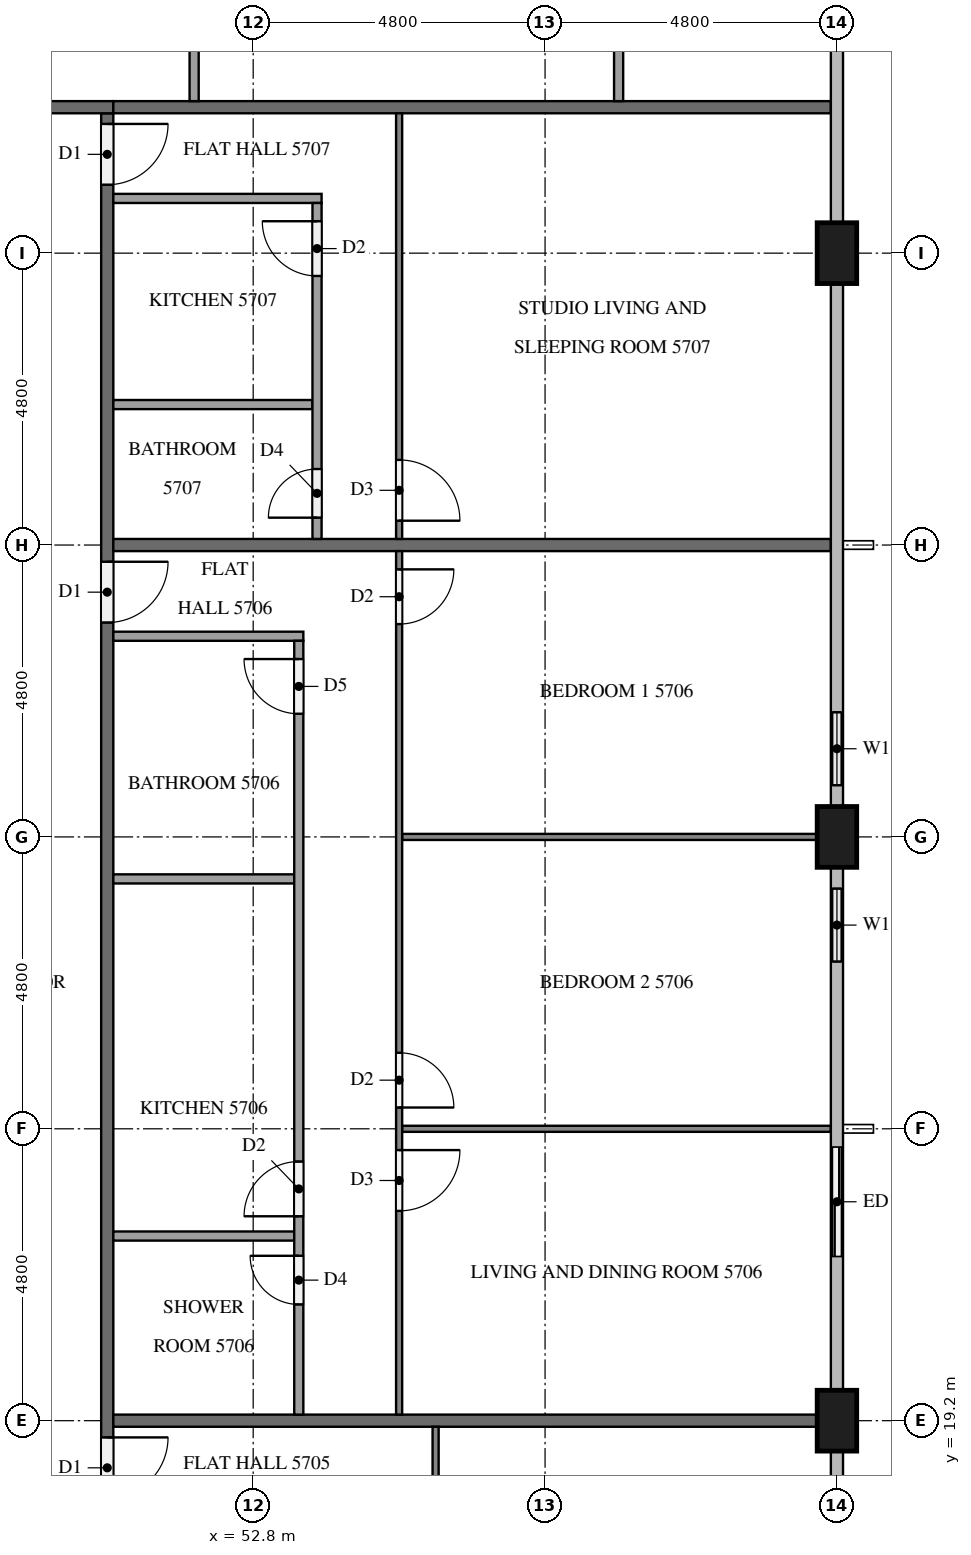
"""IFC4 building model, lengths in metres.
Left out: names, types, materials, properties, quantities, classifications, styles, units other than length and angle.
Written with IfcOpenShell. Run it as: python <this file> out.ifc"""

import sys

from ifc_helpers import new_model, si_unit, direction, frame, frame_2d, origin, origin_2d, place, context, subcontext, project, spatial, rectangle, extrude, element, fill, save


model = new_model("IFC4")
c1 = context("Model", 3, precision=1e-05, world=origin(), true_north=direction((0.0, 1.0)))
c2 = subcontext(c1, "Body", "Model", "MODEL_VIEW")
j1 = project(units=[si_unit("LENGTHUNIT", "METRE"), si_unit("PLANEANGLEUNIT", "RADIAN")], contexts=[c1])
p1 = place(None, origin())
s1 = spatial("IfcSite", under=j1, at=p1, CompositionType="ELEMENT")
p2 = place(p1, origin())
s2 = spatial("IfcBuilding", under=s1, at=p2, CompositionType="ELEMENT")
p3 = place(p2, frame((0.0, 0.0, 219.3)))
s3 = spatial("IfcBuildingStorey", under=s2, at=p3, CompositionType="ELEMENT", Elevation=219.3)
for number, where, z_axis, x_axis in (
    (1, (62.4, 19.2, 0.0), (0.0, 0.0, 1.0), (0.0, 1.0, 0.0)),
    (2, (62.4, 28.8, 0.0), (0.0, 0.0, 1.0), (0.0, 1.0, 0.0)),
    (3, (62.4, 38.4, 0.0), (0.0, 0.0, 1.0), (0.0, 1.0, 0.0)),
):
    element("IfcColumn", number, at=place(p3, frame(where, z_axis=z_axis, x_axis=x_axis)), inside=s3, PredefinedType="COLUMN", context=c2, shape_type="SweptSolid", body=[
        extrude(rectangle(XDim=1.0, YDim=0.65, at=origin_2d()), origin(), (0.0, 0.0, 1.0), 3.2),
    ])
p4 = place(p3, frame((62.4, 21.6, 0.0), z_axis=(0.0, 0.0, 1.0), x_axis=(0.0, 1.0, 0.0)))
e4 = element("IfcWall", 4, at=p4, inside=s3, PredefinedType="SOLIDWALL", context=c2, shape_type="SweptSolid", body=[
    extrude(rectangle(XDim=2.4, YDim=0.15, at=frame_2d((1.2, 0.0))), origin(), (0.0, 0.0, 1.0), 3.2),
])
p5 = place(p4, frame((0.3, 0.0, 0.0)))
e5 = element("IfcOpeningElement", 5, at=p5, cuts=e4, PredefinedType="OPENING", context=c2, shape_type="SweptSolid", body=[
    extrude(rectangle(XDim=1.8, YDim=2.4, at=frame_2d((0.9, 1.2))), frame((0.0, 0.085, 0.0), z_axis=(0.0, -1.0, 0.0), x_axis=(1.0, 0.0, 0.0)), (0.0, 0.0, 1.0), 0.17),
])
p6 = place(p3, frame((62.4, 26.4, 0.0), z_axis=(0.0, 0.0, 1.0), x_axis=(0.0, 1.0, 0.0)))
e6 = element("IfcWall", 6, at=p6, inside=s3, PredefinedType="SOLIDWALL", context=c2, shape_type="SweptSolid", body=[
    extrude(rectangle(XDim=1.9, YDim=0.15, at=frame_2d((0.95, 0.0))), origin(), (0.0, 0.0, 1.0), 3.2),
])
p7 = place(p6, frame((0.35, 0.0, 0.9)))
e7 = element("IfcOpeningElement", 7, at=p7, cuts=e6, PredefinedType="OPENING", context=c2, shape_type="SweptSolid", body=[
    extrude(rectangle(XDim=1.2, YDim=1.4, at=frame_2d((0.6, 0.7))), frame((0.0, 0.085, 0.0), z_axis=(0.0, -1.0, 0.0), x_axis=(1.0, 0.0, 0.0)), (0.0, 0.0, 1.0), 0.17),
])
p8 = place(p3, frame((62.4, 29.3, 0.0), z_axis=(0.0, 0.0, 1.0), x_axis=(0.0, 1.0, 0.0)))
e8 = element("IfcWall", 8, at=p8, inside=s3, PredefinedType="SOLIDWALL", context=c2, shape_type="SweptSolid", body=[
    extrude(rectangle(XDim=1.9, YDim=0.15, at=frame_2d((0.95, 0.0))), origin(), (0.0, 0.0, 1.0), 3.2),
])
p9 = place(p8, frame((0.35, 0.0, 0.9)))
e9 = element("IfcOpeningElement", 9, at=p9, cuts=e8, PredefinedType="OPENING", context=c2, shape_type="SweptSolid", body=[
    extrude(rectangle(XDim=1.2, YDim=1.4, at=frame_2d((0.6, 0.7))), frame((0.0, 0.085, 0.0), z_axis=(0.0, -1.0, 0.0), x_axis=(1.0, 0.0, 0.0)), (0.0, 0.0, 1.0), 0.17),
])
p10 = place(p3, frame((50.4, 40.7, 0.0), z_axis=(0.0, 0.0, 1.0), x_axis=(0.0, -1.0, 0.0)))
e10 = element("IfcWall", 10, at=p10, inside=s3, PredefinedType="PARTITIONING", context=c2, shape_type="SweptSolid", body=[
    extrude(rectangle(XDim=28.6, YDim=0.2, at=frame_2d((14.3, 0.0))), origin(), (0.0, 0.0, 1.0), 3.2),
])
p11 = place(p10, frame((21.775, 0.0, 0.0)))
e11 = element("IfcOpeningElement", 11, at=p11, cuts=e10, PredefinedType="OPENING", context=c2, shape_type="SweptSolid", body=[
    extrude(rectangle(XDim=1.0, YDim=2.1, at=frame_2d((0.5, 1.05))), frame((0.0, 0.11, 0.0), z_axis=(0.0, -1.0, 0.0), x_axis=(1.0, 0.0, 0.0)), (0.0, 0.0, 1.0), 0.22),
])
p12 = place(p10, frame((7.375, 0.0, 0.0)))
e12 = element("IfcOpeningElement", 12, at=p12, cuts=e10, PredefinedType="OPENING", context=c2, shape_type="SweptSolid", body=[
    extrude(rectangle(XDim=1.0, YDim=2.1, at=frame_2d((0.5, 1.05))), frame((0.0, 0.11, 0.0), z_axis=(0.0, -1.0, 0.0), x_axis=(1.0, 0.0, 0.0)), (0.0, 0.0, 1.0), 0.22),
])
p13 = place(p10, frame((0.175, 0.0, 0.0)))
e13 = element("IfcOpeningElement", 13, at=p13, cuts=e10, PredefinedType="OPENING", context=c2, shape_type="SweptSolid", body=[
    extrude(rectangle(XDim=1.0, YDim=2.1, at=frame_2d((0.5, 1.05))), frame((0.0, 0.11, 0.0), z_axis=(0.0, -1.0, 0.0), x_axis=(1.0, 0.0, 0.0)), (0.0, 0.0, 1.0), 0.22),
])
p14 = place(p3, frame((11.9, 40.8, 0.0), z_axis=(0.0, 0.0, 1.0), x_axis=(1.0, 0.0, 0.0)))
e14 = element("IfcWall", 14, at=p14, inside=s3, PredefinedType="PARTITIONING", context=c2, shape_type="SweptSolid", body=[
    extrude(rectangle(XDim=38.6, YDim=0.2, at=frame_2d((19.3, 0.0))), origin(), (0.0, 0.0, 1.0), 3.2),
])
p15 = place(p14, frame((33.975, 0.0, 0.0)))
e15 = element("IfcOpeningElement", 15, at=p15, cuts=e14, PredefinedType="OPENING", context=c2, shape_type="SweptSolid", body=[
    extrude(rectangle(XDim=1.0, YDim=2.1, at=frame_2d((0.5, 1.05))), frame((0.0, 0.11, 0.0), z_axis=(0.0, -1.0, 0.0), x_axis=(1.0, 0.0, 0.0)), (0.0, 0.0, 1.0), 0.22),
])
p16 = place(p14, frame((14.725, 0.0, 0.0)))
e16 = element("IfcOpeningElement", 16, at=p16, cuts=e14, PredefinedType="OPENING", context=c2, shape_type="SweptSolid", body=[
    extrude(rectangle(XDim=1.1, YDim=2.1, at=frame_2d((0.55, 1.05))), frame((0.0, 0.11, 0.0), z_axis=(0.0, -1.0, 0.0), x_axis=(1.0, 0.0, 0.0)), (0.0, 0.0, 1.0), 0.22),
])
p17 = place(p14, frame((7.575, 0.0, 0.0)))
e17 = element("IfcOpeningElement", 17, at=p17, cuts=e14, PredefinedType="OPENING", context=c2, shape_type="SweptSolid", body=[
    extrude(rectangle(XDim=1.0, YDim=2.1, at=frame_2d((0.5, 1.05))), frame((0.0, 0.11, 0.0), z_axis=(0.0, -1.0, 0.0), x_axis=(1.0, 0.0, 0.0)), (0.0, 0.0, 1.0), 0.22),
])
p18 = place(p14, frame((6.025, 0.0, 0.0)))
e18 = element("IfcOpeningElement", 18, at=p18, cuts=e14, PredefinedType="OPENING", context=c2, shape_type="SweptSolid", body=[
    extrude(rectangle(XDim=1.0, YDim=2.1, at=frame_2d((0.5, 1.05))), frame((0.0, 0.11, 0.0), z_axis=(0.0, -1.0, 0.0), x_axis=(1.0, 0.0, 0.0)), (0.0, 0.0, 1.0), 0.22),
])
p19 = place(p3, frame((50.5, 19.2, 0.0), z_axis=(0.0, 0.0, 1.0), x_axis=(1.0, 0.0, 0.0)))
e19 = element("IfcWall", 19, at=p19, inside=s3, PredefinedType="PARTITIONING", context=c2, shape_type="SweptSolid", body=[
    extrude(rectangle(XDim=11.575, YDim=0.2, at=frame_2d((5.788, 0.0))), origin(), (0.0, 0.0, 1.0), 3.2),
])
for number, where, z_axis, x_axis in (
    (20, (50.5, 33.6, 0.0), (0.0, 0.0, 1.0), (1.0, 0.0, 0.0)),
    (21, (50.5, 40.8, 0.0), (0.0, 0.0, 1.0), (1.0, 0.0, 0.0)),
):
    element("IfcWall", number, at=place(p3, frame(where, z_axis=z_axis, x_axis=x_axis)), inside=s3, PredefinedType="PARTITIONING", context=c2, shape_type="SweptSolid", body=[
        extrude(rectangle(XDim=11.8, YDim=0.2, at=frame_2d((5.9, 0.0))), origin(), (0.0, 0.0, 1.0), 3.2),
    ])
p20 = place(p3, frame((55.8, 19.1, 0.0), z_axis=(0.0, 0.0, 1.0), x_axis=(0.0, -1.0, 0.0)))
e22 = element("IfcWall", 22, at=p20, inside=s3, PredefinedType="PARTITIONING", context=c2, shape_type="SweptSolid", body=[
    extrude(rectangle(XDim=7.0, YDim=0.1, at=frame_2d((3.5, 0.0))), origin(), (0.0, 0.0, 1.0), 3.2),
])
p21 = place(p20, frame((5.7, 0.0, 0.0)))
e23 = element("IfcOpeningElement", 23, at=p21, cuts=e22, PredefinedType="OPENING", context=c2, shape_type="SweptSolid", body=[
    extrude(rectangle(XDim=1.0, YDim=2.1, at=frame_2d((0.5, 1.05))), frame((0.0, 0.06, 0.0), z_axis=(0.0, -1.0, 0.0), x_axis=(1.0, 0.0, 0.0)), (0.0, 0.0, 1.0), 0.12),
])
p22 = place(p3, frame((55.25, 28.8, 0.0), z_axis=(0.0, 0.0, 1.0), x_axis=(1.0, 0.0, 0.0)))
e24 = element("IfcWall", 24, at=p22, inside=s3, PredefinedType="PARTITIONING", context=c2, shape_type="SweptSolid", body=[
    extrude(rectangle(XDim=6.825, YDim=0.1, at=frame_2d((3.413, 0.0))), origin(), (0.0, 0.0, 1.0), 3.2),
])
p23 = place(p3, frame((55.25, 24.0, 0.0), z_axis=(0.0, 0.0, 1.0), x_axis=(1.0, 0.0, 0.0)))
e25 = element("IfcWall", 25, at=p23, inside=s3, PredefinedType="PARTITIONING", context=c2, shape_type="SweptSolid", body=[
    extrude(rectangle(XDim=7.05, YDim=0.1, at=frame_2d((3.525, 0.0))), origin(), (0.0, 0.0, 1.0), 3.2),
])
p24 = place(p3, frame((55.2, 33.5, 0.0), z_axis=(0.0, 0.0, 1.0), x_axis=(0.0, -1.0, 0.0)))
e26 = element("IfcWall", 26, at=p24, inside=s3, PredefinedType="PARTITIONING", context=c2, shape_type="SweptSolid", body=[
    extrude(rectangle(XDim=14.2, YDim=0.1, at=frame_2d((7.1, 0.0))), origin(), (0.0, 0.0, 1.0), 3.2),
])
p25 = place(p24, frame((0.3, 0.0, 0.0)))
e27 = element("IfcOpeningElement", 27, at=p25, cuts=e26, PredefinedType="OPENING", context=c2, shape_type="SweptSolid", body=[
    extrude(rectangle(XDim=0.9, YDim=2.1, at=frame_2d((0.45, 1.05))), frame((0.0, 0.06, 0.0), z_axis=(0.0, -1.0, 0.0), x_axis=(1.0, 0.0, 0.0)), (0.0, 0.0, 1.0), 0.12),
])
p26 = place(p24, frame((8.25, 0.0, 0.0)))
e28 = element("IfcOpeningElement", 28, at=p26, cuts=e26, PredefinedType="OPENING", context=c2, shape_type="SweptSolid", body=[
    extrude(rectangle(XDim=0.9, YDim=2.1, at=frame_2d((0.45, 1.05))), frame((0.0, 0.06, 0.0), z_axis=(0.0, -1.0, 0.0), x_axis=(1.0, 0.0, 0.0)), (0.0, 0.0, 1.0), 0.12),
])
p27 = place(p24, frame((9.85, 0.0, 0.0)))
e29 = element("IfcOpeningElement", 29, at=p27, cuts=e26, PredefinedType="OPENING", context=c2, shape_type="SweptSolid", body=[
    extrude(rectangle(XDim=1.0, YDim=2.1, at=frame_2d((0.5, 1.05))), frame((0.0, 0.06, 0.0), z_axis=(0.0, -1.0, 0.0), x_axis=(1.0, 0.0, 0.0)), (0.0, 0.0, 1.0), 0.12),
])
for number, where, z_axis, x_axis in (
    (30, (50.5, 28.11, 0.0), (0.0, 0.0, 1.0), (1.0, 0.0, 0.0)),
    (31, (50.5, 22.237, 0.0), (0.0, 0.0, 1.0), (1.0, 0.0, 0.0)),
):
    element("IfcWall", number, at=place(p3, frame(where, z_axis=z_axis, x_axis=x_axis)), inside=s3, PredefinedType="PARTITIONING", context=c2, shape_type="SweptSolid", body=[
        extrude(rectangle(XDim=2.975, YDim=0.15, at=frame_2d((1.488, 0.0))), origin(), (0.0, 0.0, 1.0), 3.2),
    ])
p28 = place(p3, frame((50.5, 32.1, 0.0), z_axis=(0.0, 0.0, 1.0), x_axis=(1.0, 0.0, 0.0)))
e32 = element("IfcWall", 32, at=p28, inside=s3, PredefinedType="PARTITIONING", context=c2, shape_type="SweptSolid", body=[
    extrude(rectangle(XDim=3.125, YDim=0.15, at=frame_2d((1.562, 0.0))), origin(), (0.0, 0.0, 1.0), 3.2),
])
p29 = place(p3, frame((53.55, 19.3, 0.0), z_axis=(0.0, 0.0, 1.0), x_axis=(0.0, 1.0, 0.0)))
e33 = element("IfcWall", 33, at=p29, inside=s3, PredefinedType="PARTITIONING", context=c2, shape_type="SweptSolid", body=[
    extrude(rectangle(XDim=12.725, YDim=0.15, at=frame_2d((6.362, 0.0))), origin(), (0.0, 0.0, 1.0), 3.2),
])
p30 = place(p29, frame((11.525, 0.0, 0.0)))
e34 = element("IfcOpeningElement", 34, at=p30, cuts=e33, PredefinedType="OPENING", context=c2, shape_type="SweptSolid", body=[
    extrude(rectangle(XDim=0.9, YDim=2.1, at=frame_2d((0.45, 1.05))), frame((0.0, 0.085, 0.0), z_axis=(0.0, -1.0, 0.0), x_axis=(1.0, 0.0, 0.0)), (0.0, 0.0, 1.0), 0.17),
])
p31 = place(p29, frame((3.261, 0.0, 0.0)))
e35 = element("IfcOpeningElement", 35, at=p31, cuts=e33, PredefinedType="OPENING", context=c2, shape_type="SweptSolid", body=[
    extrude(rectangle(XDim=0.9, YDim=2.1, at=frame_2d((0.45, 1.05))), frame((0.0, 0.085, 0.0), z_axis=(0.0, -1.0, 0.0), x_axis=(1.0, 0.0, 0.0)), (0.0, 0.0, 1.0), 0.17),
])
p32 = place(p29, frame((1.812, 0.0, 0.0)))
e36 = element("IfcOpeningElement", 36, at=p32, cuts=e33, PredefinedType="OPENING", context=c2, shape_type="SweptSolid", body=[
    extrude(rectangle(XDim=0.8, YDim=2.1, at=frame_2d((0.4, 1.05))), frame((0.0, 0.085, 0.0), z_axis=(0.0, -1.0, 0.0), x_axis=(1.0, 0.0, 0.0)), (0.0, 0.0, 1.0), 0.17),
])
p33 = place(p3, frame((55.2, 40.7, 0.0), z_axis=(0.0, 0.0, 1.0), x_axis=(0.0, -1.0, 0.0)))
e37 = element("IfcWall", 37, at=p33, inside=s3, PredefinedType="PARTITIONING", context=c2, shape_type="SweptSolid", body=[
    extrude(rectangle(XDim=7.0, YDim=0.1, at=frame_2d((3.5, 0.0))), origin(), (0.0, 0.0, 1.0), 3.2),
])
p34 = place(p33, frame((5.7, 0.0, 0.0)))
e38 = element("IfcOpeningElement", 38, at=p34, cuts=e37, PredefinedType="OPENING", context=c2, shape_type="SweptSolid", body=[
    extrude(rectangle(XDim=1.0, YDim=2.1, at=frame_2d((0.5, 1.05))), frame((0.0, 0.06, 0.0), z_axis=(0.0, -1.0, 0.0), x_axis=(1.0, 0.0, 0.0)), (0.0, 0.0, 1.0), 0.12),
])
p35 = place(p3, frame((50.5, 35.91, 0.0), z_axis=(0.0, 0.0, 1.0), x_axis=(1.0, 0.0, 0.0)))
e39 = element("IfcWall", 39, at=p35, inside=s3, PredefinedType="PARTITIONING", context=c2, shape_type="SweptSolid", body=[
    extrude(rectangle(XDim=3.275, YDim=0.15, at=frame_2d((1.637, 0.0))), origin(), (0.0, 0.0, 1.0), 3.2),
])
p36 = place(p3, frame((50.5, 39.3, 0.0), z_axis=(0.0, 0.0, 1.0), x_axis=(1.0, 0.0, 0.0)))
e40 = element("IfcWall", 40, at=p36, inside=s3, PredefinedType="PARTITIONING", context=c2, shape_type="SweptSolid", body=[
    extrude(rectangle(XDim=3.425, YDim=0.15, at=frame_2d((1.712, 0.0))), origin(), (0.0, 0.0, 1.0), 3.2),
])
p37 = place(p3, frame((53.85, 33.7, 0.0), z_axis=(0.0, 0.0, 1.0), x_axis=(0.0, 1.0, 0.0)))
e41 = element("IfcWall", 41, at=p37, inside=s3, PredefinedType="PARTITIONING", context=c2, shape_type="SweptSolid", body=[
    extrude(rectangle(XDim=5.525, YDim=0.15, at=frame_2d((2.763, 0.0))), origin(), (0.0, 0.0, 1.0), 3.2),
])
p38 = place(p37, frame((4.325, 0.0, 0.0)))
e42 = element("IfcOpeningElement", 42, at=p38, cuts=e41, PredefinedType="OPENING", context=c2, shape_type="SweptSolid", body=[
    extrude(rectangle(XDim=0.9, YDim=2.1, at=frame_2d((0.45, 1.05))), frame((0.0, 0.085, 0.0), z_axis=(0.0, -1.0, 0.0), x_axis=(1.0, 0.0, 0.0)), (0.0, 0.0, 1.0), 0.17),
])
p39 = place(p37, frame((0.35, 0.0, 0.0)))
e43 = element("IfcOpeningElement", 43, at=p39, cuts=e41, PredefinedType="OPENING", context=c2, shape_type="SweptSolid", body=[
    extrude(rectangle(XDim=0.8, YDim=2.1, at=frame_2d((0.4, 1.05))), frame((0.0, 0.085, 0.0), z_axis=(0.0, -1.0, 0.0), x_axis=(1.0, 0.0, 0.0)), (0.0, 0.0, 1.0), 0.17),
])
for number, where, z_axis, x_axis in (
    (44, (51.829, 40.9, 0.0), (0.0, 0.0, 1.0), (0.0, 1.0, 0.0)),
    (45, (58.81, 40.9, 0.0), (0.0, 0.0, 1.0), (0.0, 1.0, 0.0)),
):
    element("IfcWall", number, at=place(p3, frame(where, z_axis=z_axis, x_axis=x_axis)), inside=s3, PredefinedType="PARTITIONING", context=c2, shape_type="SweptSolid", body=[
        extrude(rectangle(XDim=2.975, YDim=0.15, at=frame_2d((1.488, 0.0))), origin(), (0.0, 0.0, 1.0), 3.2),
    ])
p40 = place(p5, origin())
e46 = element("IfcDoor", 46, at=p40, inside=s3, OperationType="SLIDING_TO_RIGHT", PredefinedType="DOOR", context=c2, shape_type="SweptSolid", body=[
    extrude(rectangle(XDim=1.8, YDim=2.4, at=frame_2d((0.9, 1.2))), frame((0.0, 0.025, 0.0), z_axis=(0.0, -1.0, 0.0), x_axis=(1.0, 0.0, 0.0)), (0.0, 0.0, 1.0), 0.05),
])
fill(e5, e46)
p41 = place(p7, origin())
e47 = element("IfcWindow", 47, at=p41, inside=s3, PartitioningType="SINGLE_PANEL", PredefinedType="WINDOW", context=c2, shape_type="SweptSolid", body=[
    extrude(rectangle(XDim=1.2, YDim=1.4, at=frame_2d((0.6, 0.7))), frame((0.0, 0.03, 0.0), z_axis=(0.0, -1.0, 0.0), x_axis=(1.0, 0.0, 0.0)), (0.0, 0.0, 1.0), 0.06),
])
fill(e7, e47)
p42 = place(p9, origin())
e48 = element("IfcWindow", 48, at=p42, inside=s3, PartitioningType="SINGLE_PANEL", PredefinedType="WINDOW", context=c2, shape_type="SweptSolid", body=[
    extrude(rectangle(XDim=1.2, YDim=1.4, at=frame_2d((0.6, 0.7))), frame((0.0, 0.03, 0.0), z_axis=(0.0, -1.0, 0.0), x_axis=(1.0, 0.0, 0.0)), (0.0, 0.0, 1.0), 0.06),
])
fill(e9, e48)
p43 = place(p11, origin())
e49 = element("IfcDoor", 49, at=p43, inside=s3, OperationType="SINGLE_SWING_LEFT", PredefinedType="DOOR", context=c2, shape_type="SweptSolid", body=[
    extrude(rectangle(XDim=1.0, YDim=2.1, at=frame_2d((0.5, 1.05))), frame((0.0, 0.025, 0.0), z_axis=(0.0, -1.0, 0.0), x_axis=(1.0, 0.0, 0.0)), (0.0, 0.0, 1.0), 0.05),
])
fill(e11, e49)
p44 = place(p12, origin())
e50 = element("IfcDoor", 50, at=p44, inside=s3, OperationType="SINGLE_SWING_LEFT", PredefinedType="DOOR", context=c2, shape_type="SweptSolid", body=[
    extrude(rectangle(XDim=1.0, YDim=2.1, at=frame_2d((0.5, 1.05))), frame((0.0, 0.025, 0.0), z_axis=(0.0, -1.0, 0.0), x_axis=(1.0, 0.0, 0.0)), (0.0, 0.0, 1.0), 0.05),
])
fill(e12, e50)
p45 = place(p13, origin())
e51 = element("IfcDoor", 51, at=p45, inside=s3, OperationType="SINGLE_SWING_LEFT", PredefinedType="DOOR", context=c2, shape_type="SweptSolid", body=[
    extrude(rectangle(XDim=1.0, YDim=2.1, at=frame_2d((0.5, 1.05))), frame((0.0, 0.025, 0.0), z_axis=(0.0, -1.0, 0.0), x_axis=(1.0, 0.0, 0.0)), (0.0, 0.0, 1.0), 0.05),
])
fill(e13, e51)
p46 = place(p25, origin())
e52 = element("IfcDoor", 52, at=p46, inside=s3, OperationType="SINGLE_SWING_LEFT", PredefinedType="DOOR", context=c2, shape_type="SweptSolid", body=[
    extrude(rectangle(XDim=0.9, YDim=2.1, at=frame_2d((0.45, 1.05))), frame((0.0, 0.025, 0.0), z_axis=(0.0, -1.0, 0.0), x_axis=(1.0, 0.0, 0.0)), (0.0, 0.0, 1.0), 0.05),
])
fill(e27, e52)
p47 = place(p26, origin())
e53 = element("IfcDoor", 53, at=p47, inside=s3, OperationType="SINGLE_SWING_RIGHT", PredefinedType="DOOR", context=c2, shape_type="SweptSolid", body=[
    extrude(rectangle(XDim=0.9, YDim=2.1, at=frame_2d((0.45, 1.05))), frame((0.0, 0.025, 0.0), z_axis=(0.0, -1.0, 0.0), x_axis=(1.0, 0.0, 0.0)), (0.0, 0.0, 1.0), 0.05),
])
fill(e28, e53)
p48 = place(p27, origin())
e54 = element("IfcDoor", 54, at=p48, inside=s3, OperationType="SINGLE_SWING_LEFT", PredefinedType="DOOR", context=c2, shape_type="SweptSolid", body=[
    extrude(rectangle(XDim=1.0, YDim=2.1, at=frame_2d((0.5, 1.05))), frame((0.0, 0.025, 0.0), z_axis=(0.0, -1.0, 0.0), x_axis=(1.0, 0.0, 0.0)), (0.0, 0.0, 1.0), 0.05),
])
fill(e29, e54)
p49 = place(p30, origin())
e55 = element("IfcDoor", 55, at=p49, inside=s3, OperationType="SINGLE_SWING_RIGHT", PredefinedType="DOOR", context=c2, shape_type="SweptSolid", body=[
    extrude(rectangle(XDim=0.9, YDim=2.1, at=frame_2d((0.45, 1.05))), frame((0.0, 0.025, 0.0), z_axis=(0.0, -1.0, 0.0), x_axis=(1.0, 0.0, 0.0)), (0.0, 0.0, 1.0), 0.05),
])
fill(e34, e55)
p50 = place(p31, origin())
e56 = element("IfcDoor", 56, at=p50, inside=s3, OperationType="SINGLE_SWING_LEFT", PredefinedType="DOOR", context=c2, shape_type="SweptSolid", body=[
    extrude(rectangle(XDim=0.9, YDim=2.1, at=frame_2d((0.45, 1.05))), frame((0.0, 0.025, 0.0), z_axis=(0.0, -1.0, 0.0), x_axis=(1.0, 0.0, 0.0)), (0.0, 0.0, 1.0), 0.05),
])
fill(e35, e56)
p51 = place(p32, origin())
e57 = element("IfcDoor", 57, at=p51, inside=s3, OperationType="SINGLE_SWING_RIGHT", PredefinedType="DOOR", context=c2, shape_type="SweptSolid", body=[
    extrude(rectangle(XDim=0.8, YDim=2.1, at=frame_2d((0.4, 1.05))), frame((0.0, 0.025, 0.0), z_axis=(0.0, -1.0, 0.0), x_axis=(1.0, 0.0, 0.0)), (0.0, 0.0, 1.0), 0.05),
])
fill(e36, e57)
p52 = place(p34, origin())
e58 = element("IfcDoor", 58, at=p52, inside=s3, OperationType="SINGLE_SWING_RIGHT", PredefinedType="DOOR", context=c2, shape_type="SweptSolid", body=[
    extrude(rectangle(XDim=1.0, YDim=2.1, at=frame_2d((0.5, 1.05))), frame((0.0, 0.025, 0.0), z_axis=(0.0, -1.0, 0.0), x_axis=(1.0, 0.0, 0.0)), (0.0, 0.0, 1.0), 0.05),
])
fill(e38, e58)
p53 = place(p38, origin())
e59 = element("IfcDoor", 59, at=p53, inside=s3, OperationType="SINGLE_SWING_RIGHT", PredefinedType="DOOR", context=c2, shape_type="SweptSolid", body=[
    extrude(rectangle(XDim=0.9, YDim=2.1, at=frame_2d((0.45, 1.05))), frame((0.0, 0.025, 0.0), z_axis=(0.0, -1.0, 0.0), x_axis=(1.0, 0.0, 0.0)), (0.0, 0.0, 1.0), 0.05),
])
fill(e42, e59)
p54 = place(p39, origin())
e60 = element("IfcDoor", 60, at=p54, inside=s3, OperationType="SINGLE_SWING_LEFT", PredefinedType="DOOR", context=c2, shape_type="SweptSolid", body=[
    extrude(rectangle(XDim=0.8, YDim=2.1, at=frame_2d((0.4, 1.05))), frame((0.0, 0.025, 0.0), z_axis=(0.0, -1.0, 0.0), x_axis=(1.0, 0.0, 0.0)), (0.0, 0.0, 1.0), 0.05),
])
fill(e43, e60)
save(model, sys.argv[1])
